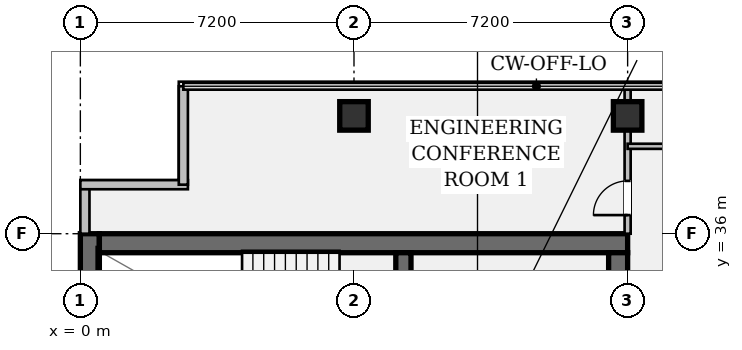
"""IFC4 building model, lengths in metres.
Left out: names, types, materials, properties, quantities, classifications, styles, units other than length and angle.
Written with IfcOpenShell. Run it as: python <this file> out.ifc"""

import sys

from ifc_helpers import new_model, si_unit, direction, frame, frame_2d, origin, origin_2d, place, context, subcontext, project, spatial, rectangle, hollow_rectangle, extrude, element, fill, save


model = new_model("IFC4")
c1 = context("Model", 3, precision=1e-05, world=origin(), true_north=direction((0.0, 1.0)))
c2 = subcontext(c1, "Body", "Model", "MODEL_VIEW")
j1 = project(units=[si_unit("LENGTHUNIT", "METRE"), si_unit("PLANEANGLEUNIT", "RADIAN")], contexts=[c1])
p1 = place(None, origin())
s1 = spatial("IfcSite", under=j1, at=p1, CompositionType="ELEMENT")
p2 = place(p1, origin())
s2 = spatial("IfcBuilding", under=s1, at=p2, CompositionType="ELEMENT")
p3 = place(p2, frame((0.0, 0.0, 201.25)))
s3 = spatial("IfcBuildingStorey", under=s2, at=p3, CompositionType="ELEMENT", Elevation=201.25)
p4 = place(p3, frame((0.25, 7.2, 0.0), z_axis=(0.0, 0.0, 1.0), x_axis=(0.0, 1.0, 0.0)))
e1 = element("IfcWall", 1, at=p4, inside=s3, PredefinedType="SHEAR", context=c2, shape_type="SweptSolid", body=[
    extrude(rectangle(XDim=28.8, YDim=0.5, at=frame_2d((14.4, 0.0))), origin(), (0.0, 0.0, 1.0), 3.24),
])
p5 = place(p3, frame((0.5, 35.75, 0.0), z_axis=(0.0, 0.0, 1.0), x_axis=(1.0, 0.0, 0.0)))
e2 = element("IfcWall", 2, at=p5, inside=s3, PredefinedType="SHEAR", context=c2, shape_type="SweptSolid", body=[
    extrude(rectangle(XDim=13.9, YDim=0.5, at=frame_2d((6.95, 0.0))), origin(), (0.0, 0.0, 1.0), 3.24),
])
p6 = place(p3, frame((14.15, 35.5, 0.0), z_axis=(0.0, 0.0, 1.0), x_axis=(0.0, -1.0, 0.0)))
e3 = element("IfcWall", 3, at=p6, inside=s3, PredefinedType="SHEAR", context=c2, shape_type="SweptSolid", body=[
    extrude(rectangle(XDim=27.8, YDim=0.5, at=frame_2d((13.9, 0.0))), origin(), (0.0, 0.0, 1.0), 3.24),
])
p7 = place(p6, frame((1.4, 0.0, 0.0)))
e4 = element("IfcOpeningElement", 4, at=p7, cuts=e3, PredefinedType="OPENING", context=c2, shape_type="SweptSolid", body=[
    extrude(rectangle(XDim=1.2, YDim=2.15, at=frame_2d((0.6, 1.075))), frame((0.0, 0.262, 0.0), z_axis=(0.0, -1.0, 0.0), x_axis=(1.0, 0.0, 0.0)), (0.0, 0.0, 1.0), 0.524),
])
p8 = place(p6, frame((25.35, 0.0, 0.0)))
e5 = element("IfcOpeningElement", 5, at=p8, cuts=e3, PredefinedType="OPENING", context=c2, shape_type="SweptSolid", body=[
    extrude(rectangle(XDim=1.2, YDim=2.15, at=frame_2d((0.6, 1.075))), frame((0.0, 0.262, 0.0), z_axis=(0.0, -1.0, 0.0), x_axis=(1.0, 0.0, 0.0)), (0.0, 0.0, 1.0), 0.524),
])
p9 = place(p6, frame((14.7, 0.0, 0.0)))
e6 = element("IfcOpeningElement", 6, at=p9, cuts=e3, PredefinedType="OPENING", context=c2, shape_type="SweptSolid", body=[
    extrude(rectangle(XDim=1.6, YDim=2.2, at=frame_2d((0.8, 1.1))), frame((0.0, 0.262, 0.0), z_axis=(0.0, -1.0, 0.0), x_axis=(1.0, 0.0, 0.0)), (0.0, 0.0, 1.0), 0.524),
])
p10 = place(p3, frame((8.5, 31.72, 0.0), z_axis=(0.0, 0.0, 1.0), x_axis=(0.0, 1.0, 0.0)))
e7 = element("IfcWall", 7, at=p10, inside=s3, PredefinedType="SHEAR", context=c2, shape_type="SweptSolid", body=[
    extrude(rectangle(XDim=3.78, YDim=0.4, at=frame_2d((1.89, 0.0))), origin(), (0.0, 0.0, 1.0), 3.24),
])
p11 = place(p10, frame((0.9, 0.0, 0.0)))
e8 = element("IfcOpeningElement", 8, at=p11, cuts=e7, PredefinedType="OPENING", context=c2, shape_type="SweptSolid", body=[
    extrude(rectangle(XDim=1.1, YDim=2.15, at=frame_2d((0.55, 1.075))), frame((0.0, 0.212, 0.0), z_axis=(0.0, -1.0, 0.0), x_axis=(1.0, 0.0, 0.0)), (0.0, 0.0, 1.0), 0.424),
])
for number, where, z_axis, x_axis in (
    (9, (7.2, 39.1, 0.0), (0.0, 0.0, 1.0), (1.0, 0.0, 0.0)),
    (10, (14.4, 39.1, 0.0), (0.0, 0.0, 1.0), (1.0, 0.0, 0.0)),
):
    element("IfcColumn", number, at=place(p3, frame(where, z_axis=z_axis, x_axis=x_axis)), inside=s3, PredefinedType="COLUMN", context=c2, shape_type="SweptSolid", body=[
        extrude(hollow_rectangle(XDim=0.75, YDim=0.75, WallThickness=0.045, at=origin_2d()), origin(), (0.0, 0.0, 1.0), 3.24),
    ])
p12 = place(p3, frame((0.12, 36.0, 0.0), z_axis=(0.0, 0.0, 1.0), x_axis=(0.0, 1.0, 0.0)))
e11 = element("IfcWall", 11, at=p12, inside=s3, PredefinedType="STANDARD", context=c2, shape_type="SweptSolid", body=[
    extrude(rectangle(XDim=1.29, YDim=0.24, at=frame_2d((0.645, 0.0))), origin(), (0.0, 0.0, 1.0), 3.24),
])
p13 = place(p3, frame((0.0, 37.29, 0.0), z_axis=(0.0, 0.0, 1.0), x_axis=(1.0, 0.0, 0.0)))
e12 = element("IfcWall", 12, at=p13, inside=s3, PredefinedType="STANDARD", context=c2, shape_type="SweptSolid", body=[
    extrude(rectangle(XDim=2.83, YDim=0.24, at=frame_2d((1.415, 0.0))), origin(), (0.0, 0.0, 1.0), 3.24),
])
p14 = place(p3, frame((2.71, 37.29, 0.0), z_axis=(0.0, 0.0, 1.0), x_axis=(0.0, 1.0, 0.0)))
e13 = element("IfcWall", 13, at=p14, inside=s3, PredefinedType="STANDARD", context=c2, shape_type="SweptSolid", body=[
    extrude(rectangle(XDim=2.59, YDim=0.24, at=frame_2d((1.295, 0.0))), origin(), (0.0, 0.0, 1.0), 3.24),
])
p15 = place(p3, frame((14.4, 36.0, 0.0), z_axis=(0.0, 0.0, 1.0), x_axis=(0.0, 1.0, 0.0)))
e14 = element("IfcWall", 14, at=p15, inside=s3, PredefinedType="PARTITIONING", context=c2, shape_type="SweptSolid", body=[
    extrude(rectangle(XDim=3.88, YDim=0.16, at=frame_2d((1.94, 0.0))), origin(), (0.0, 0.0, 1.0), 2.613),
])
p16 = place(p15, frame((0.49, 0.0, 0.0)))
e15 = element("IfcOpeningElement", 15, at=p16, cuts=e14, PredefinedType="OPENING", context=c2, shape_type="SweptSolid", body=[
    extrude(rectangle(XDim=0.9, YDim=2.15, at=frame_2d((0.45, 1.075))), frame((0.0, 0.092, 0.0), z_axis=(0.0, -1.0, 0.0), x_axis=(1.0, 0.0, 0.0)), (0.0, 0.0, 1.0), 0.184),
])
p17 = place(p3, frame((14.4, 38.3, 0.0), z_axis=(0.0, 0.0, 1.0), x_axis=(1.0, 0.0, 0.0)))
e16 = element("IfcWall", 16, at=p17, inside=s3, PredefinedType="PARTITIONING", context=c2, shape_type="SweptSolid", body=[
    extrude(rectangle(XDim=2.95, YDim=0.135, at=frame_2d((1.475, 0.0))), origin(), (0.0, 0.0, 1.0), 3.24),
])
p18 = place(p17, frame((1.54, 0.0, 0.0)))
e17 = element("IfcOpeningElement", 17, at=p18, cuts=e16, PredefinedType="OPENING", context=c2, shape_type="SweptSolid", body=[
    extrude(rectangle(XDim=0.92, YDim=2.15, at=frame_2d((0.46, 1.075))), frame((0.0, 0.08, 0.0), z_axis=(0.0, -1.0, 0.0), x_axis=(1.0, 0.0, 0.0)), (0.0, 0.0, 1.0), 0.159),
])
p19 = place(p16, origin())
e18 = element("IfcDoor", 18, at=p19, inside=s3, OperationType="SINGLE_SWING_LEFT", PredefinedType="DOOR", context=c2, shape_type="SweptSolid", body=[
    extrude(rectangle(XDim=0.9, YDim=2.15, at=frame_2d((0.45, 1.075))), frame((0.0, 0.025, 0.0), z_axis=(0.0, -1.0, 0.0), x_axis=(1.0, 0.0, 0.0)), (0.0, 0.0, 1.0), 0.05),
])
fill(e15, e18)
save(model, sys.argv[1])
